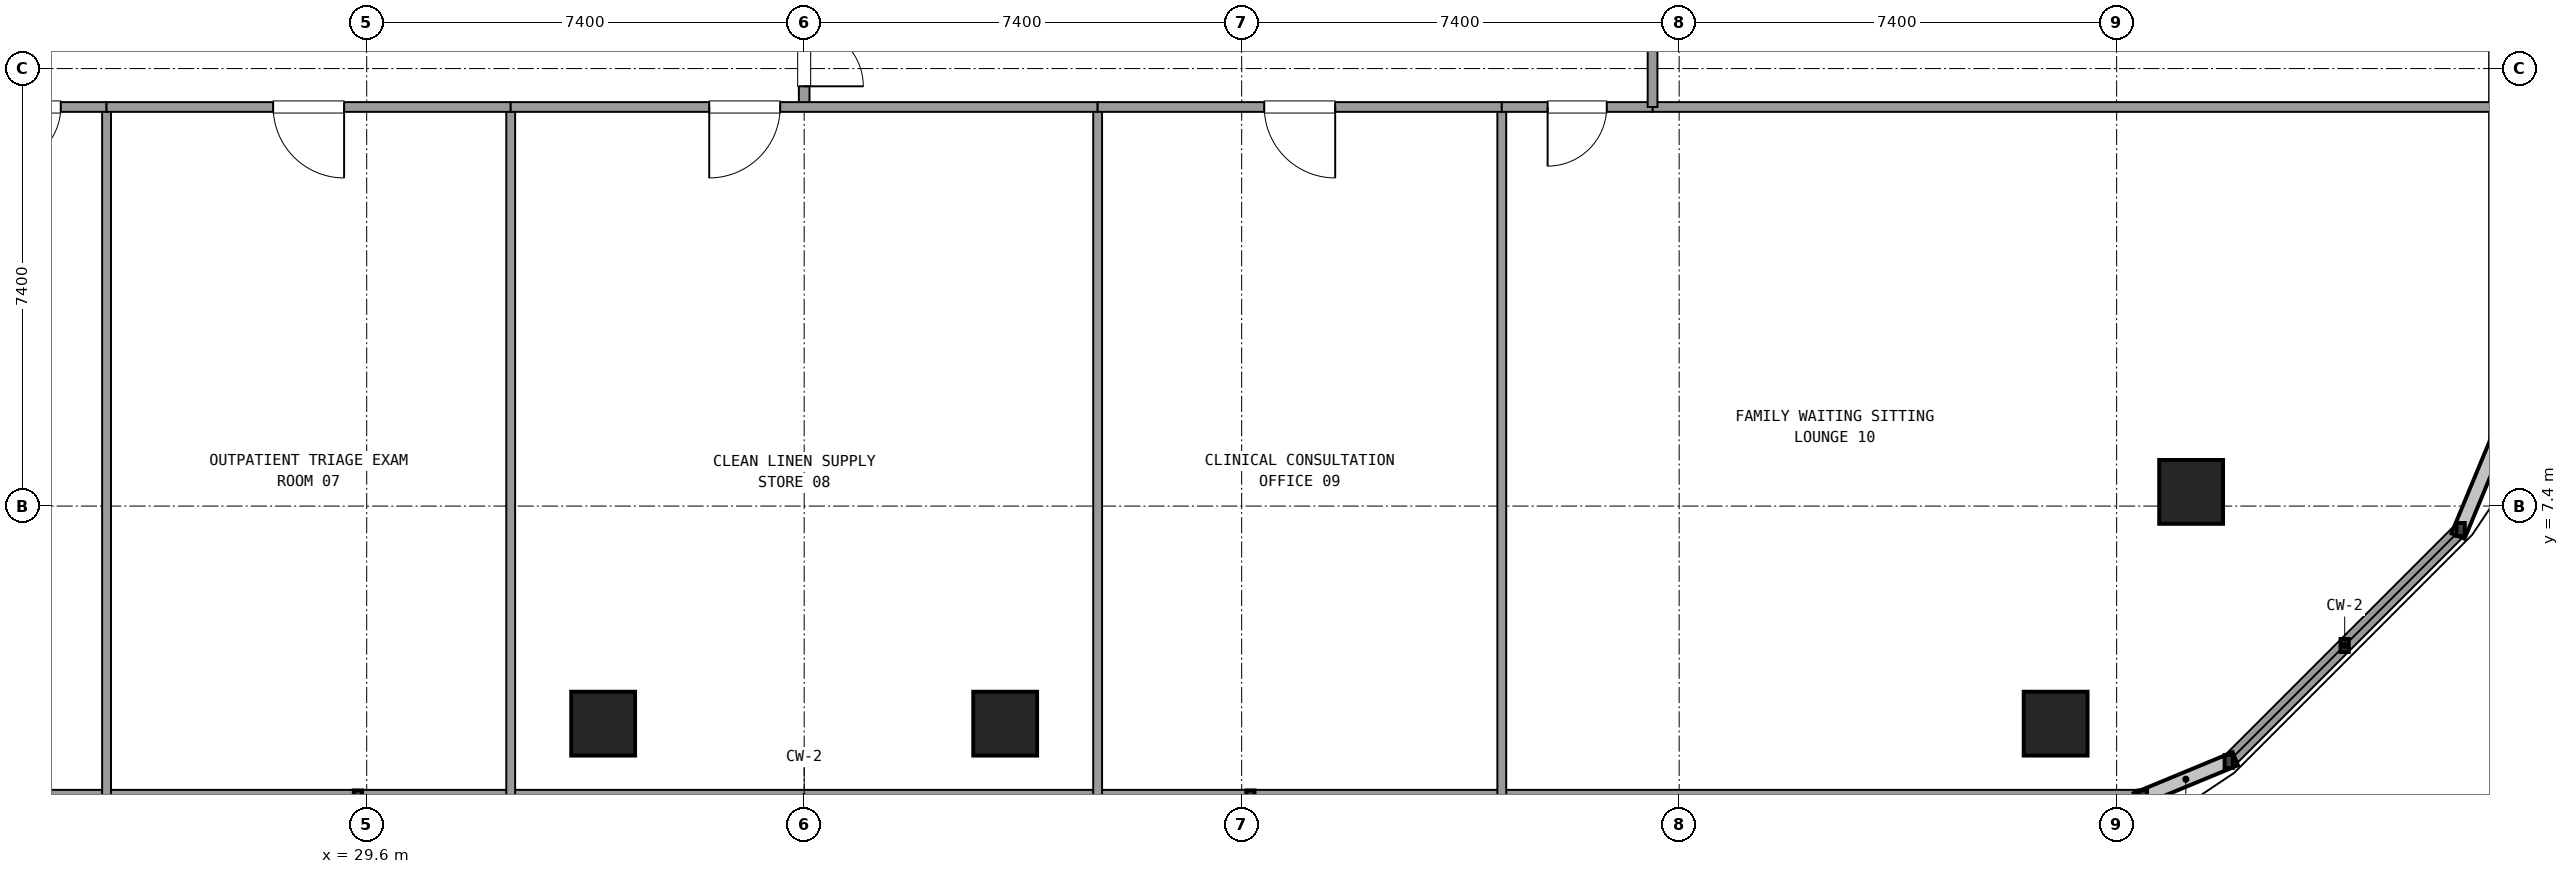
"""IFC4 building model, lengths in metres.
Left out: names, types, materials, properties, quantities, classifications, styles, units other than length and angle.
Written with IfcOpenShell. Run it as: python <this file> out.ifc"""

import sys

from ifc_helpers import new_model, si_unit, direction, frame, frame_2d, origin, origin_2d, place, context, subcontext, project, spatial, rectangle, extrude, element, fill, save


model = new_model("IFC4")
c1 = context("Model", 3, precision=1e-05, world=origin(), true_north=direction((0.0, 1.0)))
c2 = subcontext(c1, "Body", "Model", "MODEL_VIEW")
j1 = project(units=[si_unit("LENGTHUNIT", "METRE"), si_unit("PLANEANGLEUNIT", "RADIAN")], contexts=[c1])
p1 = place(None, origin())
s1 = spatial("IfcSite", under=j1, at=p1, CompositionType="ELEMENT")
p2 = place(p1, origin())
s2 = spatial("IfcBuilding", under=s1, at=p2, CompositionType="ELEMENT")
p3 = place(p2, frame((0.0, 0.0, 45.54)))
s3 = spatial("IfcBuildingStorey", under=s2, at=p3, CompositionType="ELEMENT", Elevation=45.54)
for number, where, z_axis, x_axis in (
    (1, (33.6, 3.72, 0.0), (0.0, 0.0, 1.0), (1.0, 0.0, 0.0)),
    (2, (40.4, 3.72, 0.0), (0.0, 0.0, 1.0), (1.0, 0.0, 0.0)),
    (3, (58.168, 3.72, 0.0), (0.0, 0.0, 1.0), (1.0, 0.0, 0.0)),
    (4, (60.46, 7.64, 0.0), (0.0, 0.0, 1.0), (1.0, 0.0, 0.0)),
):
    element("IfcColumn", number, at=place(p3, frame(where, z_axis=z_axis, x_axis=x_axis)), inside=s3, PredefinedType="COLUMN", context=c2, shape_type="SweptSolid", body=[
        extrude(rectangle(XDim=1.08, YDim=1.08, at=origin_2d()), origin(), (0.0, 0.0, 1.0), 3.6),
    ])
p4 = place(p3, frame((14.355, 2.48, 0.0), z_axis=(0.0, 0.0, 1.0), x_axis=(1.0, 0.0, 0.0)))
e5 = element("IfcWall", 5, at=p4, inside=s3, PredefinedType="SOLIDWALL", context=c2, shape_type="SweptSolid", body=[
    extrude(rectangle(XDim=45.29, YDim=0.24, at=frame_2d((22.645, 0.0))), origin(), (0.0, 0.0, 1.0), 0.85),
])
p5 = place(p3, frame((61.096, 3.081, 0.0), z_axis=(0.0, 0.0, 1.0), x_axis=(0.707128783731, 0.707084777957, 0.0)))
e6 = element("IfcWall", 6, at=p5, inside=s3, PredefinedType="SOLIDWALL", context=c2, shape_type="SweptSolid", body=[
    extrude(rectangle(XDim=5.548, YDim=0.24, at=frame_2d((2.774, 0.0))), origin(), (0.0, 0.0, 1.0), 0.85),
])
p6 = place(p3, frame((37.0, 14.15, 0.0), z_axis=(0.0, 0.0, 1.0), x_axis=(0.0, 1.0, 0.0)))
e7 = element("IfcWall", 7, at=p6, inside=s3, PredefinedType="PARTITIONING", context=c2, shape_type="SweptSolid", body=[
    extrude(rectangle(XDim=2.7, YDim=0.18, at=frame_2d((1.35, 0.0))), origin(), (0.0, 0.0, 1.0), 2.61),
])
p7 = place(p6, frame((0.35, 0.0, 0.0)))
e8 = element("IfcOpeningElement", 8, at=p7, cuts=e7, PredefinedType="OPENING", context=c2, shape_type="SweptSolid", body=[
    extrude(rectangle(XDim=2.0, YDim=2.2, at=frame_2d((1.0, 1.1))), frame((0.0, 0.1, 0.0), z_axis=(0.0, -1.0, 0.0), x_axis=(1.0, 0.0, 0.0)), (0.0, 0.0, 1.0), 0.2),
])
p8 = place(p3, frame((51.35, 14.15, 0.0), z_axis=(0.0, 0.0, 1.0), x_axis=(1.0, 0.0, 0.0)))
e9 = element("IfcWall", 9, at=p8, inside=s3, PredefinedType="PARTITIONING", context=c2, shape_type="SweptSolid", body=[
    extrude(rectangle(XDim=14.25, YDim=0.165, at=frame_2d((7.125, 0.0))), origin(), (0.0, 0.0, 1.0), 2.61),
])
p9 = place(p3, frame((25.2, 14.15, 0.0), z_axis=(0.0, 0.0, 1.0), x_axis=(0.0, -1.0, 0.0)))
e10 = element("IfcWall", 10, at=p9, inside=s3, PredefinedType="PARTITIONING", context=c2, shape_type="SweptSolid", body=[
    extrude(rectangle(XDim=11.65, YDim=0.15, at=frame_2d((5.825, 0.0))), origin(), (0.0, 0.0, 1.0), 2.61),
])
p10 = place(p3, frame((22.65, 14.15, 0.0), z_axis=(0.0, 0.0, 1.0), x_axis=(1.0, 0.0, 0.0)))
e11 = element("IfcWall", 11, at=p10, inside=s3, PredefinedType="PARTITIONING", context=c2, shape_type="SweptSolid", body=[
    extrude(rectangle(XDim=2.55, YDim=0.165, at=frame_2d((1.275, 0.0))), origin(), (0.0, 0.0, 1.0), 2.61),
])
p11 = place(p10, frame((0.775, 0.0, 0.0)))
e12 = element("IfcOpeningElement", 12, at=p11, cuts=e11, PredefinedType="OPENING", context=c2, shape_type="SweptSolid", body=[
    extrude(rectangle(XDim=1.0, YDim=2.15, at=frame_2d((0.5, 1.075))), frame((0.0, 0.093, 0.0), z_axis=(0.0, -1.0, 0.0), x_axis=(1.0, 0.0, 0.0)), (0.0, 0.0, 1.0), 0.185),
])
p12 = place(p3, frame((32.036, 14.15, 0.0), z_axis=(0.0, 0.0, 1.0), x_axis=(0.0, -1.0, 0.0)))
e13 = element("IfcWall", 13, at=p12, inside=s3, PredefinedType="PARTITIONING", context=c2, shape_type="SweptSolid", body=[
    extrude(rectangle(XDim=11.65, YDim=0.15, at=frame_2d((5.825, 0.0))), origin(), (0.0, 0.0, 1.0), 2.61),
])
p13 = place(p3, frame((25.2, 14.15, 0.0), z_axis=(0.0, 0.0, 1.0), x_axis=(1.0, 0.0, 0.0)))
e14 = element("IfcWall", 14, at=p13, inside=s3, PredefinedType="PARTITIONING", context=c2, shape_type="SweptSolid", body=[
    extrude(rectangle(XDim=6.836, YDim=0.165, at=frame_2d((3.418, 0.0))), origin(), (0.0, 0.0, 1.0), 2.61),
])
p14 = place(p13, frame((2.818, 0.0, 0.0)))
e15 = element("IfcOpeningElement", 15, at=p14, cuts=e14, PredefinedType="OPENING", context=c2, shape_type="SweptSolid", body=[
    extrude(rectangle(XDim=1.2, YDim=2.15, at=frame_2d((0.6, 1.075))), frame((0.0, 0.093, 0.0), z_axis=(0.0, -1.0, 0.0), x_axis=(1.0, 0.0, 0.0)), (0.0, 0.0, 1.0), 0.185),
])
p15 = place(p3, frame((41.964, 14.15, 0.0), z_axis=(0.0, 0.0, 1.0), x_axis=(0.0, -1.0, 0.0)))
e16 = element("IfcWall", 16, at=p15, inside=s3, PredefinedType="PARTITIONING", context=c2, shape_type="SweptSolid", body=[
    extrude(rectangle(XDim=11.65, YDim=0.15, at=frame_2d((5.825, 0.0))), origin(), (0.0, 0.0, 1.0), 2.61),
])
p16 = place(p3, frame((32.036, 14.15, 0.0), z_axis=(0.0, 0.0, 1.0), x_axis=(1.0, 0.0, 0.0)))
e17 = element("IfcWall", 17, at=p16, inside=s3, PredefinedType="PARTITIONING", context=c2, shape_type="SweptSolid", body=[
    extrude(rectangle(XDim=9.928, YDim=0.165, at=frame_2d((4.964, 0.0))), origin(), (0.0, 0.0, 1.0), 2.61),
])
p17 = place(p16, frame((3.358, 0.0, 0.0)))
e18 = element("IfcOpeningElement", 18, at=p17, cuts=e17, PredefinedType="OPENING", context=c2, shape_type="SweptSolid", body=[
    extrude(rectangle(XDim=1.2, YDim=2.15, at=frame_2d((0.6, 1.075))), frame((0.0, 0.093, 0.0), z_axis=(0.0, -1.0, 0.0), x_axis=(1.0, 0.0, 0.0)), (0.0, 0.0, 1.0), 0.185),
])
p18 = place(p3, frame((48.8, 14.15, 0.0), z_axis=(0.0, 0.0, 1.0), x_axis=(0.0, -1.0, 0.0)))
e19 = element("IfcWall", 19, at=p18, inside=s3, PredefinedType="PARTITIONING", context=c2, shape_type="SweptSolid", body=[
    extrude(rectangle(XDim=11.65, YDim=0.15, at=frame_2d((5.825, 0.0))), origin(), (0.0, 0.0, 1.0), 2.61),
])
p19 = place(p3, frame((41.964, 14.15, 0.0), z_axis=(0.0, 0.0, 1.0), x_axis=(1.0, 0.0, 0.0)))
e20 = element("IfcWall", 20, at=p19, inside=s3, PredefinedType="PARTITIONING", context=c2, shape_type="SweptSolid", body=[
    extrude(rectangle(XDim=6.836, YDim=0.165, at=frame_2d((3.418, 0.0))), origin(), (0.0, 0.0, 1.0), 2.61),
])
p20 = place(p19, frame((2.818, 0.0, 0.0)))
e21 = element("IfcOpeningElement", 21, at=p20, cuts=e20, PredefinedType="OPENING", context=c2, shape_type="SweptSolid", body=[
    extrude(rectangle(XDim=1.2, YDim=2.15, at=frame_2d((0.6, 1.075))), frame((0.0, 0.093, 0.0), z_axis=(0.0, -1.0, 0.0), x_axis=(1.0, 0.0, 0.0)), (0.0, 0.0, 1.0), 0.185),
])
p21 = place(p3, frame((48.8, 14.15, 0.0), z_axis=(0.0, 0.0, 1.0), x_axis=(1.0, 0.0, 0.0)))
e22 = element("IfcWall", 22, at=p21, inside=s3, PredefinedType="PARTITIONING", context=c2, shape_type="SweptSolid", body=[
    extrude(rectangle(XDim=2.55, YDim=0.165, at=frame_2d((1.275, 0.0))), origin(), (0.0, 0.0, 1.0), 2.61),
])
p22 = place(p21, frame((0.775, 0.0, 0.0)))
e23 = element("IfcOpeningElement", 23, at=p22, cuts=e22, PredefinedType="OPENING", context=c2, shape_type="SweptSolid", body=[
    extrude(rectangle(XDim=1.0, YDim=2.15, at=frame_2d((0.5, 1.075))), frame((0.0, 0.093, 0.0), z_axis=(0.0, -1.0, 0.0), x_axis=(1.0, 0.0, 0.0)), (0.0, 0.0, 1.0), 0.185),
])
p23 = place(p3, frame((51.35, 14.15, 0.0), z_axis=(0.0, 0.0, 1.0), x_axis=(0.0, 1.0, 0.0)))
e24 = element("IfcWall", 24, at=p23, inside=s3, PredefinedType="PARTITIONING", context=c2, shape_type="SweptSolid", body=[
    extrude(rectangle(XDim=5.875, YDim=0.165, at=frame_2d((2.938, 0.0))), origin(), (0.0, 0.0, 1.0), 2.61),
])
p24 = place(p23, frame((2.337, 0.0, 0.0)))
e25 = element("IfcOpeningElement", 25, at=p24, cuts=e24, PredefinedType="OPENING", context=c2, shape_type="SweptSolid", body=[
    extrude(rectangle(XDim=1.2, YDim=2.15, at=frame_2d((0.6, 1.075))), frame((0.0, 0.093, 0.0), z_axis=(0.0, -1.0, 0.0), x_axis=(1.0, 0.0, 0.0)), (0.0, 0.0, 1.0), 0.185),
])
p25 = place(p7, frame((2.0, 0.0, 0.0), z_axis=(0.0, 0.0, 1.0), x_axis=(-1.0, 0.0, 0.0)))
e26 = element("IfcDoor", 26, at=p25, inside=s3, OperationType="DOUBLE_DOOR_SINGLE_SWING", PredefinedType="DOOR", context=c2, shape_type="SweptSolid", body=[
    extrude(rectangle(XDim=2.0, YDim=2.2, at=frame_2d((1.0, 1.1))), frame((0.0, 0.025, 0.0), z_axis=(0.0, -1.0, 0.0), x_axis=(1.0, 0.0, 0.0)), (0.0, 0.0, 1.0), 0.05),
])
fill(e8, e26)
p26 = place(p11, frame((1.0, 0.0, 0.0), z_axis=(0.0, 0.0, 1.0), x_axis=(-1.0, 0.0, 0.0)))
e27 = element("IfcDoor", 27, at=p26, inside=s3, OperationType="SINGLE_SWING_LEFT", PredefinedType="DOOR", context=c2, shape_type="SweptSolid", body=[
    extrude(rectangle(XDim=1.0, YDim=2.15, at=frame_2d((0.5, 1.075))), frame((0.0, 0.025, 0.0), z_axis=(0.0, -1.0, 0.0), x_axis=(1.0, 0.0, 0.0)), (0.0, 0.0, 1.0), 0.05),
])
fill(e12, e27)
p27 = place(p14, frame((1.2, 0.0, 0.0), z_axis=(0.0, 0.0, 1.0), x_axis=(-1.0, 0.0, 0.0)))
e28 = element("IfcDoor", 28, at=p27, inside=s3, OperationType="SINGLE_SWING_RIGHT", PredefinedType="DOOR", context=c2, shape_type="SweptSolid", body=[
    extrude(rectangle(XDim=1.2, YDim=2.15, at=frame_2d((0.6, 1.075))), frame((0.0, 0.025, 0.0), z_axis=(0.0, -1.0, 0.0), x_axis=(1.0, 0.0, 0.0)), (0.0, 0.0, 1.0), 0.05),
])
fill(e15, e28)
p28 = place(p17, frame((1.2, 0.0, 0.0), z_axis=(0.0, 0.0, 1.0), x_axis=(-1.0, 0.0, 0.0)))
e29 = element("IfcDoor", 29, at=p28, inside=s3, OperationType="SINGLE_SWING_LEFT", PredefinedType="DOOR", context=c2, shape_type="SweptSolid", body=[
    extrude(rectangle(XDim=1.2, YDim=2.15, at=frame_2d((0.6, 1.075))), frame((0.0, 0.025, 0.0), z_axis=(0.0, -1.0, 0.0), x_axis=(1.0, 0.0, 0.0)), (0.0, 0.0, 1.0), 0.05),
])
fill(e18, e29)
p29 = place(p20, frame((1.2, 0.0, 0.0), z_axis=(0.0, 0.0, 1.0), x_axis=(-1.0, 0.0, 0.0)))
e30 = element("IfcDoor", 30, at=p29, inside=s3, OperationType="SINGLE_SWING_RIGHT", PredefinedType="DOOR", context=c2, shape_type="SweptSolid", body=[
    extrude(rectangle(XDim=1.2, YDim=2.15, at=frame_2d((0.6, 1.075))), frame((0.0, 0.025, 0.0), z_axis=(0.0, -1.0, 0.0), x_axis=(1.0, 0.0, 0.0)), (0.0, 0.0, 1.0), 0.05),
])
fill(e21, e30)
p30 = place(p22, frame((1.0, 0.0, 0.0), z_axis=(0.0, 0.0, 1.0), x_axis=(-1.0, 0.0, 0.0)))
e31 = element("IfcDoor", 31, at=p30, inside=s3, OperationType="SINGLE_SWING_LEFT", PredefinedType="DOOR", context=c2, shape_type="SweptSolid", body=[
    extrude(rectangle(XDim=1.0, YDim=2.15, at=frame_2d((0.5, 1.075))), frame((0.0, 0.025, 0.0), z_axis=(0.0, -1.0, 0.0), x_axis=(1.0, 0.0, 0.0)), (0.0, 0.0, 1.0), 0.05),
])
fill(e23, e31)
save(model, sys.argv[1])
